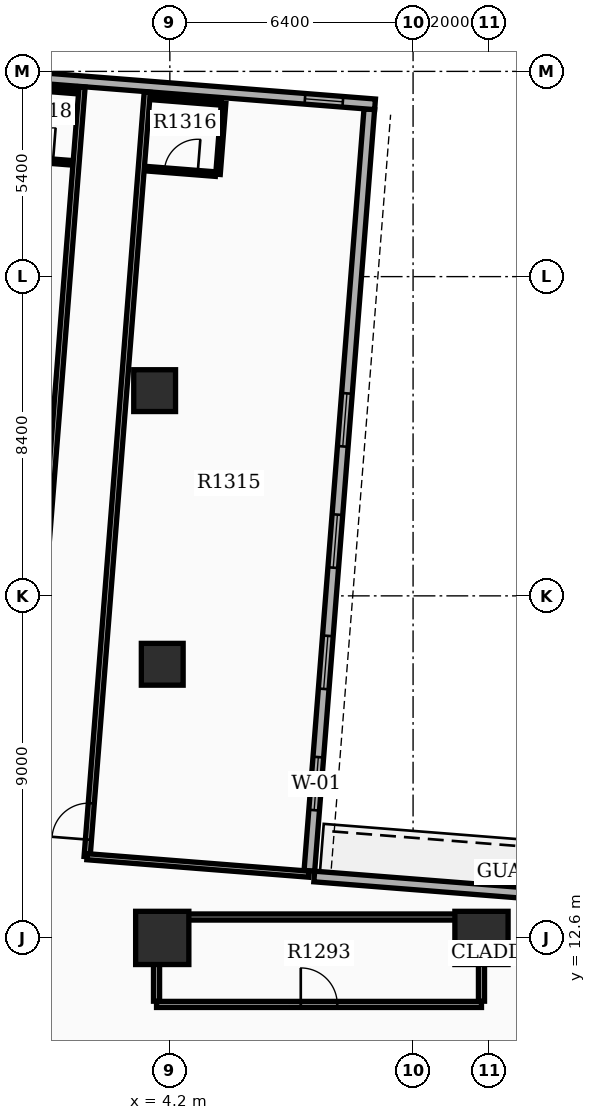
"""IFC4 building model, lengths in metres.
Left out: names, types, materials, properties, quantities, classifications, styles, units other than length and angle.
Written with IfcOpenShell. Run it as: python <this file> out.ifc"""

import sys

from ifc_helpers import new_model, si_unit, direction, frame, frame_2d, origin, origin_2d, place, context, subcontext, project, spatial, rectangle, extrude, element, fill, save


model = new_model("IFC4")
c1 = context("Model", 3, precision=1e-05, world=origin(), true_north=direction((0.0, 1.0)))
c2 = subcontext(c1, "Body", "Model", "MODEL_VIEW")
j1 = project(units=[si_unit("LENGTHUNIT", "METRE"), si_unit("PLANEANGLEUNIT", "RADIAN")], contexts=[c1])
p1 = place(None, origin())
s1 = spatial("IfcSite", under=j1, at=p1, CompositionType="ELEMENT")
p2 = place(p1, origin())
s2 = spatial("IfcBuilding", under=s1, at=p2, CompositionType="ELEMENT")
p3 = place(p2, frame((0.0, 0.0, 83.4)))
s3 = spatial("IfcBuildingStorey", under=s2, at=p3, CompositionType="ELEMENT", Elevation=83.4)
for number, where, z_axis, x_axis in (
    (1, (12.4, 12.6, 0.0), (0.0, 0.0, 1.0), (1.0, 0.0, 0.0)),
    (2, (4.0, 12.6, 0.0), (0.0, 0.0, 1.0), (1.0, 0.0, 0.0)),
):
    element("IfcColumn", number, at=place(p3, frame(where, z_axis=z_axis, x_axis=x_axis)), inside=s3, PredefinedType="COLUMN", context=c2, shape_type="SweptSolid", body=[
        extrude(rectangle(XDim=1.4, YDim=1.4, at=origin_2d()), origin(), (0.0, 0.0, 1.0), 3.9),
    ])
for number, where, z_axis, x_axis in (
    (3, (4.0, 19.8, 0.0), (0.0, 0.0, 1.0), (1.0, 0.0, 0.0)),
    (4, (3.8, 27.0, 0.0), (0.0, 0.0, 1.0), (1.0, 0.0, 0.0)),
):
    element("IfcColumn", number, at=place(p3, frame(where, z_axis=z_axis, x_axis=x_axis)), inside=s3, PredefinedType="COLUMN", context=c2, shape_type="SweptSolid", body=[
        extrude(rectangle(XDim=1.1, YDim=1.1, at=origin_2d()), origin(), (0.0, 0.0, 1.0), 3.9),
    ])
p4 = place(p3, frame((7.872, 14.367, 0.0), z_axis=(0.0, 0.0, 1.0), x_axis=(0.078452802979, 0.996917828963, 0.0)))
e5 = element("IfcWall", 5, at=p4, inside=s3, PredefinedType="STANDARD", context=c2, shape_type="SweptSolid", body=[
    extrude(rectangle(XDim=20.1, YDim=0.28, at=frame_2d((10.05, 0.0))), origin(), (0.0, 0.0, 1.0), 2.91),
])
p5 = place(p4, frame((1.6, 0.0, 0.8)))
e6 = element("IfcOpeningElement", 6, at=p5, cuts=e5, PredefinedType="OPENING", context=c2, shape_type="SweptSolid", body=[
    extrude(rectangle(XDim=1.4, YDim=1.6, at=frame_2d((0.7, 0.8))), frame((0.0, 0.15, 0.0), z_axis=(0.0, -1.0, 0.0), x_axis=(1.0, 0.0, 0.0)), (0.0, 0.0, 1.0), 0.3),
])
p6 = place(p4, frame((4.8, 0.0, 0.8)))
e7 = element("IfcOpeningElement", 7, at=p6, cuts=e5, PredefinedType="OPENING", context=c2, shape_type="SweptSolid", body=[
    extrude(rectangle(XDim=1.4, YDim=1.6, at=frame_2d((0.7, 0.8))), frame((0.0, 0.15, 0.0), z_axis=(0.0, -1.0, 0.0), x_axis=(1.0, 0.0, 0.0)), (0.0, 0.0, 1.0), 0.3),
])
p7 = place(p4, frame((8.0, 0.0, 0.8)))
e8 = element("IfcOpeningElement", 8, at=p7, cuts=e5, PredefinedType="OPENING", context=c2, shape_type="SweptSolid", body=[
    extrude(rectangle(XDim=1.4, YDim=1.6, at=frame_2d((0.7, 0.8))), frame((0.0, 0.15, 0.0), z_axis=(0.0, -1.0, 0.0), x_axis=(1.0, 0.0, 0.0)), (0.0, 0.0, 1.0), 0.3),
])
p8 = place(p4, frame((11.2, 0.0, 0.8)))
e9 = element("IfcOpeningElement", 9, at=p8, cuts=e5, PredefinedType="OPENING", context=c2, shape_type="SweptSolid", body=[
    extrude(rectangle(XDim=1.4, YDim=1.6, at=frame_2d((0.7, 0.8))), frame((0.0, 0.15, 0.0), z_axis=(0.0, -1.0, 0.0), x_axis=(1.0, 0.0, 0.0)), (0.0, 0.0, 1.0), 0.3),
])
p9 = place(p3, frame((9.599, 34.533, 0.0), z_axis=(0.0, 0.0, 1.0), x_axis=(-0.996916198482, 0.078473519122, 0.0)))
e10 = element("IfcWall", 10, at=p9, inside=s3, PredefinedType="STANDARD", context=c2, shape_type="SweptSolid", body=[
    extrude(rectangle(XDim=13.72, YDim=0.28, at=frame_2d((6.86, 0.0))), origin(), (0.0, 0.0, 1.0), 2.91),
])
p10 = place(p9, frame((0.85, 0.0, 0.85)))
e11 = element("IfcOpeningElement", 11, at=p10, cuts=e10, PredefinedType="OPENING", context=c2, shape_type="SweptSolid", body=[
    extrude(rectangle(XDim=1.0, YDim=1.5, at=frame_2d((0.5, 0.75))), frame((0.0, 0.15, 0.0), z_axis=(0.0, -1.0, 0.0), x_axis=(1.0, 0.0, 0.0)), (0.0, 0.0, 1.0), 0.3),
])
p11 = place(p3, frame((14.281, 13.722, 0.0), z_axis=(0.0, 0.0, 1.0), x_axis=(-0.99691915642, 0.078435932851, 0.0)))
e12 = element("IfcWall", 12, at=p11, inside=s3, PredefinedType="STANDARD", context=c2, shape_type="SweptSolid", body=[
    extrude(rectangle(XDim=6.3, YDim=0.28, at=frame_2d((3.15, 0.0))), origin(), (0.0, 0.0, 1.0), 2.91),
])
p12 = place(p3, frame((3.85, 10.85, 0.0), z_axis=(0.0, 0.0, 1.0), x_axis=(1.0, 0.0, 0.0)))
e13 = element("IfcWall", 13, at=p12, inside=s3, PredefinedType="PARTITIONING", context=c2, shape_type="SweptSolid", body=[
    extrude(rectangle(XDim=8.55, YDim=0.16, at=frame_2d((4.275, 0.0))), origin(), (0.0, 0.0, 1.0), 2.9),
])
p13 = place(p12, frame((3.795, 0.0, 0.0)))
e14 = element("IfcOpeningElement", 14, at=p13, cuts=e13, PredefinedType="OPENING", context=c2, shape_type="SweptSolid", body=[
    extrude(rectangle(XDim=0.96, YDim=2.15, at=frame_2d((0.48, 1.075))), frame((0.0, 0.09, 0.0), z_axis=(0.0, -1.0, 0.0), x_axis=(1.0, 0.0, 0.0)), (0.0, 0.0, 1.0), 0.18),
])
p14 = place(p3, frame((3.85, 13.15, 0.0), z_axis=(0.0, 0.0, 1.0), x_axis=(1.0, 0.0, 0.0)))
e15 = element("IfcWall", 15, at=p14, inside=s3, PredefinedType="PARTITIONING", context=c2, shape_type="SweptSolid", body=[
    extrude(rectangle(XDim=8.55, YDim=0.16, at=frame_2d((4.275, 0.0))), origin(), (0.0, 0.0, 1.0), 2.9),
])
for number, where, z_axis, x_axis in (
    (16, (3.85, 10.935, 0.0), (0.0, 0.0, 1.0), (0.0, 1.0, 0.0)),
    (17, (12.4, 10.935, 0.0), (0.0, 0.0, 1.0), (0.0, 1.0, 0.0)),
):
    element("IfcWall", number, at=place(p3, frame(where, z_axis=z_axis, x_axis=x_axis)), inside=s3, PredefinedType="PARTITIONING", context=c2, shape_type="SweptSolid", body=[
        extrude(rectangle(XDim=2.13, YDim=0.16, at=frame_2d((1.065, 0.0))), origin(), (0.0, 0.0, 1.0), 2.9),
    ])
p15 = place(p3, frame((2.022, 14.737, 0.0), z_axis=(0.0, 0.0, 1.0), x_axis=(0.078461408156, 0.996917151738, 0.0)))
e18 = element("IfcWall", 18, at=p15, inside=s3, PredefinedType="PARTITIONING", context=c2, shape_type="SweptSolid", body=[
    extrude(rectangle(XDim=20.182, YDim=0.16, at=frame_2d((10.091, 0.0))), origin(), (0.0, 0.0, 1.0), 2.9),
])
p16 = place(p15, frame((0.45, 0.0, 0.0)))
e19 = element("IfcOpeningElement", 19, at=p16, cuts=e18, PredefinedType="OPENING", context=c2, shape_type="SweptSolid", body=[
    extrude(rectangle(XDim=0.96, YDim=2.15, at=frame_2d((0.48, 1.075))), frame((0.0, 0.09, 0.0), z_axis=(0.0, -1.0, 0.0), x_axis=(1.0, 0.0, 0.0)), (0.0, 0.0, 1.0), 0.18),
])
p17 = place(p3, frame((2.022, 14.737, 0.0), z_axis=(0.0, 0.0, 1.0), x_axis=(0.996918158581, -0.078448614343, 0.0)))
e20 = element("IfcWall", 20, at=p17, inside=s3, PredefinedType="PARTITIONING", context=c2, shape_type="SweptSolid", body=[
    extrude(rectangle(XDim=5.86, YDim=0.16, at=frame_2d((2.93, 0.0))), origin(), (0.0, 0.0, 1.0), 2.9),
])
p18 = place(p3, frame((3.588, 32.84, 0.0), z_axis=(0.0, 0.0, 1.0), x_axis=(0.996916400774, -0.0784709492, 0.0)))
e21 = element("IfcWall", 21, at=p18, inside=s3, PredefinedType="PARTITIONING", context=c2, shape_type="SweptSolid", body=[
    extrude(rectangle(XDim=1.82, YDim=0.12, at=frame_2d((0.91, 0.0))), origin(), (0.0, 0.0, 1.0), 2.9),
])
p19 = place(p18, frame((0.47, 0.0, 0.0)))
e22 = element("IfcOpeningElement", 22, at=p19, cuts=e21, PredefinedType="OPENING", context=c2, shape_type="SweptSolid", body=[
    extrude(rectangle(XDim=0.88, YDim=2.1, at=frame_2d((0.44, 1.05))), frame((0.0, 0.07, 0.0), z_axis=(0.0, -1.0, 0.0), x_axis=(1.0, 0.0, 0.0)), (0.0, 0.0, 1.0), 0.14),
])
p20 = place(p3, frame((3.735, 34.714, 0.0), z_axis=(0.0, 0.0, 1.0), x_axis=(0.996916400774, -0.0784709492, 0.0)))
e23 = element("IfcWall", 23, at=p20, inside=s3, PredefinedType="PARTITIONING", context=c2, shape_type="SweptSolid", body=[
    extrude(rectangle(XDim=1.82, YDim=0.12, at=frame_2d((0.91, 0.0))), origin(), (0.0, 0.0, 1.0), 2.9),
])
p21 = place(p3, frame((5.467, 32.692, 0.0), z_axis=(0.0, 0.0, 1.0), x_axis=(0.07843418698, 0.996919293781, 0.0)))
e24 = element("IfcWall", 24, at=p21, inside=s3, PredefinedType="PARTITIONING", context=c2, shape_type="SweptSolid", body=[
    extrude(rectangle(XDim=1.88, YDim=0.12, at=frame_2d((0.94, 0.0))), origin(), (0.0, 0.0, 1.0), 2.9),
])
p22 = place(p3, frame((0.308, 14.872, 0.0), z_axis=(0.0, 0.0, 1.0), x_axis=(0.0784484395, 0.996918172339, 0.0)))
e25 = element("IfcWall", 25, at=p22, inside=s3, PredefinedType="PARTITIONING", context=c2, shape_type="SweptSolid", body=[
    extrude(rectangle(XDim=20.182, YDim=0.16, at=frame_2d((10.091, 0.0))), origin(), (0.0, 0.0, 1.0), 2.9),
])
p23 = place(p22, frame((0.45, 0.0, 0.0)))
e26 = element("IfcOpeningElement", 26, at=p23, cuts=e25, PredefinedType="OPENING", context=c2, shape_type="SweptSolid", body=[
    extrude(rectangle(XDim=0.96, YDim=2.15, at=frame_2d((0.48, 1.075))), frame((0.0, 0.09, 0.0), z_axis=(0.0, -1.0, 0.0), x_axis=(1.0, 0.0, 0.0)), (0.0, 0.0, 1.0), 0.18),
])
p24 = place(p3, frame((-0.221, 33.139, 0.0), z_axis=(0.0, 0.0, 1.0), x_axis=(0.996916400774, -0.0784709492, 0.0)))
e27 = element("IfcWall", 27, at=p24, inside=s3, PredefinedType="PARTITIONING", context=c2, shape_type="SweptSolid", body=[
    extrude(rectangle(XDim=1.82, YDim=0.12, at=frame_2d((0.91, 0.0))), origin(), (0.0, 0.0, 1.0), 2.9),
])
p25 = place(p24, frame((0.47, 0.0, 0.0)))
e28 = element("IfcOpeningElement", 28, at=p25, cuts=e27, PredefinedType="OPENING", context=c2, shape_type="SweptSolid", body=[
    extrude(rectangle(XDim=0.88, YDim=2.1, at=frame_2d((0.44, 1.05))), frame((0.0, 0.07, 0.0), z_axis=(0.0, -1.0, 0.0), x_axis=(1.0, 0.0, 0.0)), (0.0, 0.0, 1.0), 0.14),
])
p26 = place(p3, frame((-0.073, 35.014, 0.0), z_axis=(0.0, 0.0, 1.0), x_axis=(0.996915574626, -0.078481444107, 0.0)))
e29 = element("IfcWall", 29, at=p26, inside=s3, PredefinedType="PARTITIONING", context=c2, shape_type="SweptSolid", body=[
    extrude(rectangle(XDim=1.82, YDim=0.12, at=frame_2d((0.91, 0.0))), origin(), (0.0, 0.0, 1.0), 2.9),
])
p27 = place(p5, origin())
e30 = element("IfcWindow", 30, at=p27, inside=s3, PartitioningType="SINGLE_PANEL", PredefinedType="WINDOW", context=c2, shape_type="SweptSolid", body=[
    extrude(rectangle(XDim=1.4, YDim=1.6, at=frame_2d((0.7, 0.8))), frame((0.0, 0.03, 0.0), z_axis=(0.0, -1.0, 0.0), x_axis=(1.0, 0.0, 0.0)), (0.0, 0.0, 1.0), 0.06),
])
fill(e6, e30)
p28 = place(p6, origin())
e31 = element("IfcWindow", 31, at=p28, inside=s3, PartitioningType="SINGLE_PANEL", PredefinedType="WINDOW", context=c2, shape_type="SweptSolid", body=[
    extrude(rectangle(XDim=1.4, YDim=1.6, at=frame_2d((0.7, 0.8))), frame((0.0, 0.03, 0.0), z_axis=(0.0, -1.0, 0.0), x_axis=(1.0, 0.0, 0.0)), (0.0, 0.0, 1.0), 0.06),
])
fill(e7, e31)
p29 = place(p7, origin())
e32 = element("IfcWindow", 32, at=p29, inside=s3, PartitioningType="SINGLE_PANEL", PredefinedType="WINDOW", context=c2, shape_type="SweptSolid", body=[
    extrude(rectangle(XDim=1.4, YDim=1.6, at=frame_2d((0.7, 0.8))), frame((0.0, 0.03, 0.0), z_axis=(0.0, -1.0, 0.0), x_axis=(1.0, 0.0, 0.0)), (0.0, 0.0, 1.0), 0.06),
])
fill(e8, e32)
p30 = place(p8, origin())
e33 = element("IfcWindow", 33, at=p30, inside=s3, PartitioningType="SINGLE_PANEL", PredefinedType="WINDOW", context=c2, shape_type="SweptSolid", body=[
    extrude(rectangle(XDim=1.4, YDim=1.6, at=frame_2d((0.7, 0.8))), frame((0.0, 0.03, 0.0), z_axis=(0.0, -1.0, 0.0), x_axis=(1.0, 0.0, 0.0)), (0.0, 0.0, 1.0), 0.06),
])
fill(e9, e33)
p31 = place(p10, origin())
e34 = element("IfcWindow", 34, at=p31, inside=s3, PartitioningType="SINGLE_PANEL", PredefinedType="WINDOW", context=c2, shape_type="SweptSolid", body=[
    extrude(rectangle(XDim=1.0, YDim=1.5, at=frame_2d((0.5, 0.75))), frame((0.0, 0.03, 0.0), z_axis=(0.0, -1.0, 0.0), x_axis=(1.0, 0.0, 0.0)), (0.0, 0.0, 1.0), 0.06),
])
fill(e11, e34)
p32 = place(p13, origin())
e35 = element("IfcDoor", 35, at=p32, inside=s3, OperationType="SINGLE_SWING_LEFT", PredefinedType="DOOR", context=c2, shape_type="SweptSolid", body=[
    extrude(rectangle(XDim=0.96, YDim=2.15, at=frame_2d((0.48, 1.075))), frame((0.0, 0.025, 0.0), z_axis=(0.0, -1.0, 0.0), x_axis=(1.0, 0.0, 0.0)), (0.0, 0.0, 1.0), 0.05),
])
fill(e14, e35)
p33 = place(p16, origin())
e36 = element("IfcDoor", 36, at=p33, inside=s3, OperationType="SINGLE_SWING_LEFT", PredefinedType="DOOR", context=c2, shape_type="SweptSolid", body=[
    extrude(rectangle(XDim=0.96, YDim=2.15, at=frame_2d((0.48, 1.075))), frame((0.0, 0.025, 0.0), z_axis=(0.0, -1.0, 0.0), x_axis=(1.0, 0.0, 0.0)), (0.0, 0.0, 1.0), 0.05),
])
fill(e19, e36)
p34 = place(p19, origin())
e37 = element("IfcDoor", 37, at=p34, inside=s3, OperationType="SINGLE_SWING_RIGHT", PredefinedType="DOOR", context=c2, shape_type="SweptSolid", body=[
    extrude(rectangle(XDim=0.88, YDim=2.1, at=frame_2d((0.44, 1.05))), frame((0.0, 0.025, 0.0), z_axis=(0.0, -1.0, 0.0), x_axis=(1.0, 0.0, 0.0)), (0.0, 0.0, 1.0), 0.05),
])
fill(e22, e37)
p35 = place(p25, origin())
e38 = element("IfcDoor", 38, at=p35, inside=s3, OperationType="SINGLE_SWING_RIGHT", PredefinedType="DOOR", context=c2, shape_type="SweptSolid", body=[
    extrude(rectangle(XDim=0.88, YDim=2.1, at=frame_2d((0.44, 1.05))), frame((0.0, 0.025, 0.0), z_axis=(0.0, -1.0, 0.0), x_axis=(1.0, 0.0, 0.0)), (0.0, 0.0, 1.0), 0.05),
])
fill(e28, e38)
save(model, sys.argv[1])
